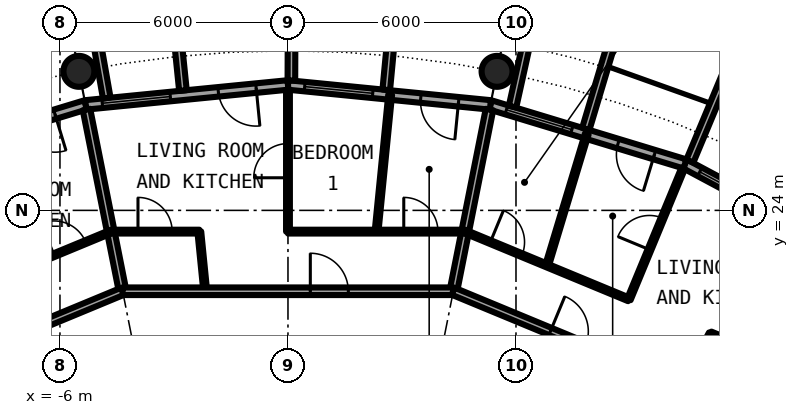
"""IFC4 building model, lengths in metres.
Left out: names, types, materials, properties, quantities, classifications, styles, units other than length and angle.
Written with IfcOpenShell. Run it as: python <this file> out.ifc"""

import sys

from ifc_helpers import new_model, si_unit, direction, frame, frame_2d, origin, origin_2d, place, context, subcontext, project, spatial, rectangle, hollow_circle, extrude, element, fill, save


model = new_model("IFC4")
c1 = context("Model", 3, precision=1e-05, world=origin(), true_north=direction((0.0, 1.0)))
c2 = subcontext(c1, "Body", "Model", "MODEL_VIEW")
j1 = project(units=[si_unit("LENGTHUNIT", "METRE"), si_unit("PLANEANGLEUNIT", "RADIAN")], contexts=[c1])
p1 = place(None, origin())
s1 = spatial("IfcSite", under=j1, at=p1, CompositionType="ELEMENT")
p2 = place(p1, origin())
s2 = spatial("IfcBuilding", under=s1, at=p2, CompositionType="ELEMENT")
p3 = place(p2, frame((0.0, 0.0, 170.75)))
s3 = spatial("IfcBuildingStorey", under=s2, at=p3, CompositionType="ELEMENT", Elevation=170.75)
for number, where, z_axis, x_axis in (
    (1, (5.501, 27.658, 0.0), (0.0, 0.0, 1.0), (1.0, 0.0, 0.0)),
    (2, (-5.501, 27.658, 0.0), (0.0, 0.0, 1.0), (1.0, 0.0, 0.0)),
):
    element("IfcColumn", number, at=place(p3, frame(where, z_axis=z_axis, x_axis=x_axis)), inside=s3, PredefinedType="COLUMN", context=c2, shape_type="SweptSolid", body=[
        extrude(hollow_circle(Radius=0.406, WallThickness=0.04, at=origin_2d()), origin(), (0.0, 0.0, 1.0), 3.05),
    ])
p4 = place(p3, frame((15.167, 22.699, 0.0), z_axis=(0.0, 0.0, 1.0), x_axis=(-0.881915646801, 0.471407246368, 0.0)))
e3 = element("IfcWall", 3, at=p4, inside=s3, PredefinedType="SOLIDWALL", context=c2, shape_type="SweptSolid", body=[
    extrude(rectangle(XDim=5.352, YDim=0.25, at=frame_2d((2.676, 0.0))), origin(), (0.0, 0.0, 1.0), 2.7),
])
p5 = place(p4, frame((0.841, 0.0, 0.0)))
e4 = element("IfcOpeningElement", 4, at=p5, cuts=e3, PredefinedType="OPENING", context=c2, shape_type="SweptSolid", body=[
    extrude(rectangle(XDim=1.0, YDim=2.2, at=frame_2d((0.5, 1.1))), frame((0.0, 0.135, 0.0), z_axis=(0.0, -1.0, 0.0), x_axis=(1.0, 0.0, 0.0)), (0.0, 0.0, 1.0), 0.27),
])
p6 = place(p4, frame((3.111, 0.0, 0.3)))
e5 = element("IfcOpeningElement", 5, at=p6, cuts=e3, PredefinedType="OPENING", context=c2, shape_type="SweptSolid", body=[
    extrude(rectangle(XDim=1.8, YDim=2.1, at=frame_2d((0.9, 1.05))), frame((0.0, 0.135, 0.0), z_axis=(0.0, -1.0, 0.0), x_axis=(1.0, 0.0, 0.0)), (0.0, 0.0, 1.0), 0.27),
])
p7 = place(p3, frame((10.575, 25.295, -0.03), z_axis=(0.0, 0.0, 1.0), x_axis=(0.385697364644, 0.922625353492, 0.0)))
e6 = element("IfcWall", 6, at=p7, inside=s3, PredefinedType="SOLIDWALL", context=c2, shape_type="SweptSolid", body=[
    extrude(rectangle(XDim=2.883, YDim=0.2, at=frame_2d((1.442, 0.0))), origin(), (0.0, 0.0, 1.0), 2.73),
])
p8 = place(p3, frame((10.447, 25.222, 0.0), z_axis=(0.0, 0.0, 1.0), x_axis=(-0.956965678721, 0.290201119486, 0.0)))
e7 = element("IfcWall", 7, at=p8, inside=s3, PredefinedType="SOLIDWALL", context=c2, shape_type="SweptSolid", body=[
    extrude(rectangle(XDim=5.351, YDim=0.25, at=frame_2d((2.676, 0.0))), origin(), (0.0, 0.0, 1.0), 2.7),
])
p9 = place(p8, frame((0.841, 0.0, 0.0)))
e8 = element("IfcOpeningElement", 8, at=p9, cuts=e7, PredefinedType="OPENING", context=c2, shape_type="SweptSolid", body=[
    extrude(rectangle(XDim=1.0, YDim=2.2, at=frame_2d((0.5, 1.1))), frame((0.0, 0.135, 0.0), z_axis=(0.0, -1.0, 0.0), x_axis=(1.0, 0.0, 0.0)), (0.0, 0.0, 1.0), 0.27),
])
p10 = place(p8, frame((3.111, 0.0, 0.3)))
e9 = element("IfcOpeningElement", 9, at=p10, cuts=e7, PredefinedType="OPENING", context=c2, shape_type="SweptSolid", body=[
    extrude(rectangle(XDim=1.8, YDim=2.1, at=frame_2d((0.9, 1.05))), frame((0.0, 0.135, 0.0), z_axis=(0.0, -1.0, 0.0), x_axis=(1.0, 0.0, 0.0)), (0.0, 0.0, 1.0), 0.27),
])
p11 = place(p3, frame((7.837, 26.144, -0.03), z_axis=(0.0, 0.0, 1.0), x_axis=(0.287064767992, 0.957911174889, 0.0)))
e10 = element("IfcWall", 10, at=p11, inside=s3, PredefinedType="SOLIDWALL", context=c2, shape_type="SweptSolid", body=[
    extrude(rectangle(XDim=3.006, YDim=0.2, at=frame_2d((1.503, 0.0))), origin(), (0.0, 0.0, 1.0), 2.73),
])
p12 = place(p3, frame((5.909, 26.729, -0.03), z_axis=(0.0, 0.0, 1.0), x_axis=(0.216409053917, 0.976302781612, 0.0)))
e11 = element("IfcWall", 11, at=p12, inside=s3, PredefinedType="SOLIDWALL", context=c2, shape_type="SweptSolid", body=[
    extrude(rectangle(XDim=2.925, YDim=0.2, at=frame_2d((1.463, 0.0))), origin(), (0.0, 0.0, 1.0), 2.73),
])
p13 = place(p3, frame((5.326, 26.775, 0.0), z_axis=(0.0, 0.0, 1.0), x_axis=(-0.995173996315, 0.098126026407, 0.0)))
e12 = element("IfcWall", 12, at=p13, inside=s3, PredefinedType="SOLIDWALL", context=c2, shape_type="SweptSolid", body=[
    extrude(rectangle(XDim=5.352, YDim=0.25, at=frame_2d((2.676, 0.0))), origin(), (0.0, 0.0, 1.0), 2.7),
])
p14 = place(p13, frame((0.841, 0.0, 0.0)))
e13 = element("IfcOpeningElement", 13, at=p14, cuts=e12, PredefinedType="OPENING", context=c2, shape_type="SweptSolid", body=[
    extrude(rectangle(XDim=1.0, YDim=2.2, at=frame_2d((0.5, 1.1))), frame((0.0, 0.135, 0.0), z_axis=(0.0, -1.0, 0.0), x_axis=(1.0, 0.0, 0.0)), (0.0, 0.0, 1.0), 0.27),
])
p15 = place(p13, frame((3.111, 0.0, 0.3)))
e14 = element("IfcOpeningElement", 14, at=p15, cuts=e12, PredefinedType="OPENING", context=c2, shape_type="SweptSolid", body=[
    extrude(rectangle(XDim=1.8, YDim=2.1, at=frame_2d((0.9, 1.05))), frame((0.0, 0.135, 0.0), z_axis=(0.0, -1.0, 0.0), x_axis=(1.0, 0.0, 0.0)), (0.0, 0.0, 1.0), 0.27),
])
p16 = place(p3, frame((2.586, 27.171, -0.03), z_axis=(0.0, 0.0, 1.0), x_axis=(0.094548432284, 0.995520262954, 0.0)))
e15 = element("IfcWall", 15, at=p16, inside=s3, PredefinedType="SOLIDWALL", context=c2, shape_type="SweptSolid", body=[
    extrude(rectangle(XDim=3.006, YDim=0.2, at=frame_2d((1.503, 0.0))), origin(), (0.0, 0.0, 1.0), 2.73),
])
p17 = place(p3, frame((0.09, 27.417, -0.03), z_axis=(0.0, 0.0, 1.0), x_axis=(0.00347308367, 0.999993968827, 0.0)))
e16 = element("IfcWall", 16, at=p17, inside=s3, PredefinedType="SOLIDWALL", context=c2, shape_type="SweptSolid", body=[
    extrude(rectangle(XDim=2.882, YDim=0.2, at=frame_2d((1.441, 0.0))), origin(), (0.0, 0.0, 1.0), 2.73),
])
p18 = place(p3, frame((0.0, 27.3, 0.0), z_axis=(0.0, 0.0, 1.0), x_axis=(-0.995173996315, -0.098126026407, 0.0)))
e17 = element("IfcWall", 17, at=p18, inside=s3, PredefinedType="SOLIDWALL", context=c2, shape_type="SweptSolid", body=[
    extrude(rectangle(XDim=5.352, YDim=0.25, at=frame_2d((2.676, 0.0))), origin(), (0.0, 0.0, 1.0), 2.7),
])
p19 = place(p18, frame((0.841, 0.0, 0.0)))
e18 = element("IfcOpeningElement", 18, at=p19, cuts=e17, PredefinedType="OPENING", context=c2, shape_type="SweptSolid", body=[
    extrude(rectangle(XDim=1.0, YDim=2.2, at=frame_2d((0.5, 1.1))), frame((0.0, 0.135, 0.0), z_axis=(0.0, -1.0, 0.0), x_axis=(1.0, 0.0, 0.0)), (0.0, 0.0, 1.0), 0.27),
])
p20 = place(p18, frame((3.111, 0.0, 0.3)))
e19 = element("IfcOpeningElement", 19, at=p20, cuts=e17, PredefinedType="OPENING", context=c2, shape_type="SweptSolid", body=[
    extrude(rectangle(XDim=1.8, YDim=2.1, at=frame_2d((0.9, 1.05))), frame((0.0, 0.135, 0.0), z_axis=(0.0, -1.0, 0.0), x_axis=(1.0, 0.0, 0.0)), (0.0, 0.0, 1.0), 0.27),
])
p21 = place(p3, frame((-2.764, 27.153, -0.03), z_axis=(0.0, 0.0, 1.0), x_axis=(-0.101505487237, 0.994834979311, 0.0)))
e20 = element("IfcWall", 20, at=p21, inside=s3, PredefinedType="SOLIDWALL", context=c2, shape_type="SweptSolid", body=[
    extrude(rectangle(XDim=3.007, YDim=0.2, at=frame_2d((1.503, 0.0))), origin(), (0.0, 0.0, 1.0), 2.73),
])
p22 = place(p3, frame((-4.769, 26.956, -0.03), z_axis=(0.0, 0.0, 1.0), x_axis=(-0.174056778901, 0.984735618183, 0.0)))
e21 = element("IfcWall", 21, at=p22, inside=s3, PredefinedType="SOLIDWALL", context=c2, shape_type="SweptSolid", body=[
    extrude(rectangle(XDim=2.925, YDim=0.2, at=frame_2d((1.462, 0.0))), origin(), (0.0, 0.0, 1.0), 2.73),
])
p23 = place(p3, frame((-5.326, 26.775, 0.0), z_axis=(0.0, 0.0, 1.0), x_axis=(-0.956965678721, -0.290201119486, 0.0)))
e22 = element("IfcWall", 22, at=p23, inside=s3, PredefinedType="SOLIDWALL", context=c2, shape_type="SweptSolid", body=[
    extrude(rectangle(XDim=5.351, YDim=0.25, at=frame_2d((2.676, 0.0))), origin(), (0.0, 0.0, 1.0), 2.7),
])
p24 = place(p23, frame((0.841, 0.0, 0.0)))
e23 = element("IfcOpeningElement", 23, at=p24, cuts=e22, PredefinedType="OPENING", context=c2, shape_type="SweptSolid", body=[
    extrude(rectangle(XDim=1.0, YDim=2.2, at=frame_2d((0.5, 1.1))), frame((0.0, 0.135, 0.0), z_axis=(0.0, -1.0, 0.0), x_axis=(1.0, 0.0, 0.0)), (0.0, 0.0, 1.0), 0.27),
])
p25 = place(p23, frame((3.111, 0.0, 0.3)))
e24 = element("IfcOpeningElement", 24, at=p25, cuts=e22, PredefinedType="OPENING", context=c2, shape_type="SweptSolid", body=[
    extrude(rectangle(XDim=1.8, YDim=2.1, at=frame_2d((0.9, 1.05))), frame((0.0, 0.135, 0.0), z_axis=(0.0, -1.0, 0.0), x_axis=(1.0, 0.0, 0.0)), (0.0, 0.0, 1.0), 0.27),
])
p26 = place(p3, frame((10.38, 19.374, 0.0), z_axis=(0.0, 0.0, 1.0), x_axis=(0.472002235476, 0.881597351236, 0.0)))
e25 = element("IfcWall", 25, at=p26, inside=s3, PredefinedType="PARTITIONING", context=c2, shape_type="SweptSolid", body=[
    extrude(rectangle(XDim=1.577, YDim=0.1, at=frame_2d((0.788, 0.0))), origin(), (0.0, 0.0, 1.0), 2.7),
])
p27 = place(p3, frame((-5.302, 26.653, 0.0), z_axis=(0.0, 0.0, 1.0), x_axis=(0.195075825861, -0.980788163756, 0.0)))
e26 = element("IfcWall", 26, at=p27, inside=s3, PredefinedType="PARTITIONING", context=c2, shape_type="SweptSolid", body=[
    extrude(rectangle(XDim=4.875, YDim=0.2, at=frame_2d((2.438, 0.0))), origin(), (0.0, 0.0, 1.0), 2.7),
])
p28 = place(p3, frame((-2.333, 23.441, 0.0), z_axis=(0.0, 0.0, 1.0), x_axis=(0.098951748623, -0.995092232632, 0.0)))
e27 = element("IfcWall", 27, at=p28, inside=s3, PredefinedType="PARTITIONING", context=c2, shape_type="SweptSolid", body=[
    extrude(rectangle(XDim=1.577, YDim=0.1, at=frame_2d((0.788, 0.0))), origin(), (0.0, 0.0, 1.0), 2.7),
])
p29 = place(p3, frame((0.0, 23.441, 0.0), z_axis=(0.0, 0.0, 1.0), x_axis=(0.0, 1.0, 0.0)))
e28 = element("IfcWall", 28, at=p29, inside=s3, PredefinedType="PARTITIONING", context=c2, shape_type="SweptSolid", body=[
    extrude(rectangle(XDim=3.734, YDim=0.1, at=frame_2d((1.867, 0.0))), origin(), (0.0, 0.0, 1.0), 2.7),
])
p30 = place(p29, frame((1.417, 0.0, 0.0)))
e29 = element("IfcOpeningElement", 29, at=p30, cuts=e28, PredefinedType="OPENING", context=c2, shape_type="SweptSolid", body=[
    extrude(rectangle(XDim=0.9, YDim=2.3, at=frame_2d((0.45, 1.15))), frame((0.0, 0.06, 0.0), z_axis=(0.0, -1.0, 0.0), x_axis=(1.0, 0.0, 0.0)), (0.0, 0.0, 1.0), 0.12),
])
p31 = place(p3, frame((2.331, 23.441, 0.0), z_axis=(0.0, 0.0, 1.0), x_axis=(0.098902534616, 0.995097125233, 0.0)))
e30 = element("IfcWall", 30, at=p31, inside=s3, PredefinedType="PARTITIONING", context=c2, shape_type="SweptSolid", body=[
    extrude(rectangle(XDim=3.619, YDim=0.1, at=frame_2d((1.81, 0.0))), origin(), (0.0, 0.0, 1.0), 2.7),
])
p32 = place(p3, frame((4.351, 21.872, 0.0), z_axis=(0.0, 0.0, 1.0), x_axis=(0.195075825861, 0.980788163756, 0.0)))
e31 = element("IfcWall", 31, at=p32, inside=s3, PredefinedType="PARTITIONING", context=c2, shape_type="SweptSolid", body=[
    extrude(rectangle(XDim=4.875, YDim=0.2, at=frame_2d((2.438, 0.0))), origin(), (0.0, 0.0, 1.0), 2.7),
])
p33 = place(p3, frame((6.817, 22.549, 0.0), z_axis=(0.0, 0.0, 1.0), x_axis=(0.289439829793, 0.957196210256, 0.0)))
e32 = element("IfcWall", 32, at=p33, inside=s3, PredefinedType="PARTITIONING", context=c2, shape_type="SweptSolid", body=[
    extrude(rectangle(XDim=3.618, YDim=0.1, at=frame_2d((1.809, 0.0))), origin(), (0.0, 0.0, 1.0), 2.7),
])
p34 = place(p3, frame((8.97, 21.657, 0.0), z_axis=(0.0, 0.0, 1.0), x_axis=(0.382761856702, 0.923847044188, 0.0)))
e33 = element("IfcWall", 33, at=p34, inside=s3, PredefinedType="PARTITIONING", context=c2, shape_type="SweptSolid", body=[
    extrude(rectangle(XDim=3.733, YDim=0.1, at=frame_2d((1.867, 0.0))), origin(), (0.0, 0.0, 1.0), 2.7),
])
p35 = place(p34, frame((1.417, 0.0, 0.0)))
e34 = element("IfcOpeningElement", 34, at=p35, cuts=e33, PredefinedType="OPENING", context=c2, shape_type="SweptSolid", body=[
    extrude(rectangle(XDim=0.9, YDim=2.3, at=frame_2d((0.45, 1.15))), frame((0.0, 0.06, 0.0), z_axis=(0.0, -1.0, 0.0), x_axis=(1.0, 0.0, 0.0)), (0.0, 0.0, 1.0), 0.12),
])
p36 = place(p3, frame((-12.396, 18.536, 0.0), z_axis=(0.0, 0.0, 1.0), x_axis=(0.923722518166, 0.383062278792, 0.0)))
e35 = element("IfcWall", 35, at=p36, inside=s3, PredefinedType="PARTITIONING", context=c2, shape_type="SweptSolid", body=[
    extrude(rectangle(XDim=8.709, YDim=0.2, at=frame_2d((4.354, 0.0))), origin(), (0.0, 0.0, 1.0), 2.7),
])
p37 = place(p36, frame((2.772, 0.0, 0.0)))
e36 = element("IfcOpeningElement", 36, at=p37, cuts=e35, PredefinedType="OPENING", context=c2, shape_type="SweptSolid", body=[
    extrude(rectangle(XDim=1.0, YDim=2.3, at=frame_2d((0.5, 1.15))), frame((0.0, 0.11, 0.0), z_axis=(0.0, -1.0, 0.0), x_axis=(1.0, 0.0, 0.0)), (0.0, 0.0, 1.0), 0.22),
])
p38 = place(p3, frame((-4.351, 21.872, 0.0), z_axis=(0.0, 0.0, 1.0), x_axis=(1.0, 0.0, 0.0)))
e37 = element("IfcWall", 37, at=p38, inside=s3, PredefinedType="PARTITIONING", context=c2, shape_type="SweptSolid", body=[
    extrude(rectangle(XDim=8.702, YDim=0.2, at=frame_2d((4.351, 0.0))), origin(), (0.0, 0.0, 1.0), 2.7),
])
p39 = place(p38, frame((4.939, 0.0, 0.0)))
e38 = element("IfcOpeningElement", 38, at=p39, cuts=e37, PredefinedType="OPENING", context=c2, shape_type="SweptSolid", body=[
    extrude(rectangle(XDim=1.0, YDim=2.3, at=frame_2d((0.5, 1.15))), frame((0.0, 0.11, 0.0), z_axis=(0.0, -1.0, 0.0), x_axis=(1.0, 0.0, 0.0)), (0.0, 0.0, 1.0), 0.22),
])
p40 = place(p3, frame((4.347, 21.872, 0.0), z_axis=(0.0, 0.0, 1.0), x_axis=(0.923921124994, -0.382583003792, 0.0)))
e39 = element("IfcWall", 39, at=p40, inside=s3, PredefinedType="PARTITIONING", context=c2, shape_type="SweptSolid", body=[
    extrude(rectangle(XDim=8.704, YDim=0.2, at=frame_2d((4.352, 0.0))), origin(), (0.0, 0.0, 1.0), 2.7),
])
p41 = place(p40, frame((2.767, 0.0, 0.0)))
e40 = element("IfcOpeningElement", 40, at=p41, cuts=e39, PredefinedType="OPENING", context=c2, shape_type="SweptSolid", body=[
    extrude(rectangle(XDim=1.0, YDim=2.3, at=frame_2d((0.5, 1.15))), frame((0.0, 0.11, 0.0), z_axis=(0.0, -1.0, 0.0), x_axis=(1.0, 0.0, 0.0)), (0.0, 0.0, 1.0), 0.22),
])
p42 = place(p3, frame((-6.817, 22.548, 0.0), z_axis=(0.0, 0.0, 1.0), x_axis=(0.924061443507, 0.382243964798, 0.0)))
e41 = element("IfcWall", 41, at=p42, inside=s3, PredefinedType="PARTITIONING", context=c2, shape_type="SweptSolid", body=[
    extrude(rectangle(XDim=2.333, YDim=0.1, at=frame_2d((1.167, 0.0))), origin(), (0.0, 0.0, 1.0), 2.7),
])
p43 = place(p42, frame((0.717, 0.0, 0.0)))
e42 = element("IfcOpeningElement", 42, at=p43, cuts=e41, PredefinedType="OPENING", context=c2, shape_type="SweptSolid", body=[
    extrude(rectangle(XDim=0.9, YDim=2.3, at=frame_2d((0.45, 1.15))), frame((0.0, 0.06, 0.0), z_axis=(0.0, -1.0, 0.0), x_axis=(1.0, 0.0, 0.0)), (0.0, 0.0, 1.0), 0.12),
])
p44 = place(p3, frame((-4.663, 23.441, 0.0), z_axis=(0.0, 0.0, 1.0), x_axis=(1.0, 0.0, 0.0)))
e43 = element("IfcWall", 43, at=p44, inside=s3, PredefinedType="PARTITIONING", context=c2, shape_type="SweptSolid", body=[
    extrude(rectangle(XDim=2.332, YDim=0.1, at=frame_2d((1.166, 0.0))), origin(), (0.0, 0.0, 1.0), 2.7),
])
p45 = place(p44, frame((0.716, 0.0, 0.0)))
e44 = element("IfcOpeningElement", 44, at=p45, cuts=e43, PredefinedType="OPENING", context=c2, shape_type="SweptSolid", body=[
    extrude(rectangle(XDim=0.9, YDim=2.3, at=frame_2d((0.45, 1.15))), frame((0.0, 0.06, 0.0), z_axis=(0.0, -1.0, 0.0), x_axis=(1.0, 0.0, 0.0)), (0.0, 0.0, 1.0), 0.12),
])
p46 = place(p3, frame((0.0, 23.441, 0.0), z_axis=(0.0, 0.0, 1.0), x_axis=(1.0, 0.0, 0.0)))
e45 = element("IfcWall", 45, at=p46, inside=s3, PredefinedType="PARTITIONING", context=c2, shape_type="SweptSolid", body=[
    extrude(rectangle(XDim=4.663, YDim=0.1, at=frame_2d((2.332, 0.0))), origin(), (0.0, 0.0, 1.0), 2.7),
])
p47 = place(p46, frame((3.047, 0.0, 0.0)))
e46 = element("IfcOpeningElement", 46, at=p47, cuts=e45, PredefinedType="OPENING", context=c2, shape_type="SweptSolid", body=[
    extrude(rectangle(XDim=0.9, YDim=2.3, at=frame_2d((0.45, 1.15))), frame((0.0, 0.06, 0.0), z_axis=(0.0, -1.0, 0.0), x_axis=(1.0, 0.0, 0.0)), (0.0, 0.0, 1.0), 0.12),
])
p48 = place(p3, frame((4.66, 23.441, 0.0), z_axis=(0.0, 0.0, 1.0), x_axis=(0.923920484476, -0.38258455061, 0.0)))
e47 = element("IfcWall", 47, at=p48, inside=s3, PredefinedType="PARTITIONING", context=c2, shape_type="SweptSolid", body=[
    extrude(rectangle(XDim=4.663, YDim=0.1, at=frame_2d((2.332, 0.0))), origin(), (0.0, 0.0, 1.0), 2.7),
])
p49 = place(p48, frame((0.72, 0.0, 0.0)))
e48 = element("IfcOpeningElement", 48, at=p49, cuts=e47, PredefinedType="OPENING", context=c2, shape_type="SweptSolid", body=[
    extrude(rectangle(XDim=0.9, YDim=2.3, at=frame_2d((0.45, 1.15))), frame((0.0, 0.06, 0.0), z_axis=(0.0, -1.0, 0.0), x_axis=(1.0, 0.0, 0.0)), (0.0, 0.0, 1.0), 0.12),
])
p50 = place(p3, frame((11.124, 20.764, 0.0), z_axis=(0.0, 0.0, 1.0), x_axis=(0.923938991376, -0.382539854414, 0.0)))
e49 = element("IfcWall", 49, at=p50, inside=s3, PredefinedType="PARTITIONING", context=c2, shape_type="SweptSolid", body=[
    extrude(rectangle(XDim=2.331, YDim=0.1, at=frame_2d((1.166, 0.0))), origin(), (0.0, 0.0, 1.0), 2.7),
])
p51 = place(p50, frame((0.716, 0.0, 0.0)))
e50 = element("IfcOpeningElement", 50, at=p51, cuts=e49, PredefinedType="OPENING", context=c2, shape_type="SweptSolid", body=[
    extrude(rectangle(XDim=0.9, YDim=2.3, at=frame_2d((0.45, 1.15))), frame((0.0, 0.06, 0.0), z_axis=(0.0, -1.0, 0.0), x_axis=(1.0, 0.0, 0.0)), (0.0, 0.0, 1.0), 0.12),
])
p52 = place(p6, origin())
e51 = element("IfcWindow", 51, at=p52, inside=s3, PartitioningType="SINGLE_PANEL", PredefinedType="WINDOW", context=c2, shape_type="SweptSolid", body=[
    extrude(rectangle(XDim=1.8, YDim=2.1, at=frame_2d((0.9, 1.05))), frame((0.0, 0.03, 0.0), z_axis=(0.0, -1.0, 0.0), x_axis=(1.0, 0.0, 0.0)), (0.0, 0.0, 1.0), 0.06),
])
fill(e5, e51)
p53 = place(p9, origin())
e52 = element("IfcDoor", 52, at=p53, inside=s3, OperationType="SINGLE_SWING_LEFT", PredefinedType="DOOR", context=c2, shape_type="SweptSolid", body=[
    extrude(rectangle(XDim=1.0, YDim=2.2, at=frame_2d((0.5, 1.1))), frame((0.0, 0.025, 0.0), z_axis=(0.0, -1.0, 0.0), x_axis=(1.0, 0.0, 0.0)), (0.0, 0.0, 1.0), 0.05),
])
fill(e8, e52)
p54 = place(p10, origin())
e53 = element("IfcWindow", 53, at=p54, inside=s3, PartitioningType="SINGLE_PANEL", PredefinedType="WINDOW", context=c2, shape_type="SweptSolid", body=[
    extrude(rectangle(XDim=1.8, YDim=2.1, at=frame_2d((0.9, 1.05))), frame((0.0, 0.03, 0.0), z_axis=(0.0, -1.0, 0.0), x_axis=(1.0, 0.0, 0.0)), (0.0, 0.0, 1.0), 0.06),
])
fill(e9, e53)
p55 = place(p14, origin())
e54 = element("IfcDoor", 54, at=p55, inside=s3, OperationType="SINGLE_SWING_LEFT", PredefinedType="DOOR", context=c2, shape_type="SweptSolid", body=[
    extrude(rectangle(XDim=1.0, YDim=2.2, at=frame_2d((0.5, 1.1))), frame((0.0, 0.025, 0.0), z_axis=(0.0, -1.0, 0.0), x_axis=(1.0, 0.0, 0.0)), (0.0, 0.0, 1.0), 0.05),
])
fill(e13, e54)
p56 = place(p15, origin())
e55 = element("IfcWindow", 55, at=p56, inside=s3, PartitioningType="SINGLE_PANEL", PredefinedType="WINDOW", context=c2, shape_type="SweptSolid", body=[
    extrude(rectangle(XDim=1.8, YDim=2.1, at=frame_2d((0.9, 1.05))), frame((0.0, 0.03, 0.0), z_axis=(0.0, -1.0, 0.0), x_axis=(1.0, 0.0, 0.0)), (0.0, 0.0, 1.0), 0.06),
])
fill(e14, e55)
p57 = place(p19, origin())
e56 = element("IfcDoor", 56, at=p57, inside=s3, OperationType="SINGLE_SWING_LEFT", PredefinedType="DOOR", context=c2, shape_type="SweptSolid", body=[
    extrude(rectangle(XDim=1.0, YDim=2.2, at=frame_2d((0.5, 1.1))), frame((0.0, 0.025, 0.0), z_axis=(0.0, -1.0, 0.0), x_axis=(1.0, 0.0, 0.0)), (0.0, 0.0, 1.0), 0.05),
])
fill(e18, e56)
p58 = place(p20, origin())
e57 = element("IfcWindow", 57, at=p58, inside=s3, PartitioningType="SINGLE_PANEL", PredefinedType="WINDOW", context=c2, shape_type="SweptSolid", body=[
    extrude(rectangle(XDim=1.8, YDim=2.1, at=frame_2d((0.9, 1.05))), frame((0.0, 0.03, 0.0), z_axis=(0.0, -1.0, 0.0), x_axis=(1.0, 0.0, 0.0)), (0.0, 0.0, 1.0), 0.06),
])
fill(e19, e57)
p59 = place(p24, origin())
e58 = element("IfcDoor", 58, at=p59, inside=s3, OperationType="SINGLE_SWING_LEFT", PredefinedType="DOOR", context=c2, shape_type="SweptSolid", body=[
    extrude(rectangle(XDim=1.0, YDim=2.2, at=frame_2d((0.5, 1.1))), frame((0.0, 0.025, 0.0), z_axis=(0.0, -1.0, 0.0), x_axis=(1.0, 0.0, 0.0)), (0.0, 0.0, 1.0), 0.05),
])
fill(e23, e58)
p60 = place(p41, origin())
e59 = element("IfcDoor", 59, at=p60, inside=s3, OperationType="SINGLE_SWING_LEFT", PredefinedType="DOOR", context=c2, shape_type="SweptSolid", body=[
    extrude(rectangle(XDim=1.0, YDim=2.3, at=frame_2d((0.5, 1.15))), frame((0.0, 0.025, 0.0), z_axis=(0.0, -1.0, 0.0), x_axis=(1.0, 0.0, 0.0)), (0.0, 0.0, 1.0), 0.05),
])
fill(e40, e59)
p61 = place(p35, origin())
e60 = element("IfcDoor", 60, at=p61, inside=s3, OperationType="SINGLE_SWING_LEFT", PredefinedType="DOOR", context=c2, shape_type="SweptSolid", body=[
    extrude(rectangle(XDim=0.9, YDim=2.3, at=frame_2d((0.45, 1.15))), frame((0.0, 0.025, 0.0), z_axis=(0.0, -1.0, 0.0), x_axis=(1.0, 0.0, 0.0)), (0.0, 0.0, 1.0), 0.05),
])
fill(e34, e60)
p62 = place(p49, origin())
e61 = element("IfcDoor", 61, at=p62, inside=s3, OperationType="SINGLE_SWING_LEFT", PredefinedType="DOOR", context=c2, shape_type="SweptSolid", body=[
    extrude(rectangle(XDim=0.9, YDim=2.3, at=frame_2d((0.45, 1.15))), frame((0.0, 0.025, 0.0), z_axis=(0.0, -1.0, 0.0), x_axis=(1.0, 0.0, 0.0)), (0.0, 0.0, 1.0), 0.05),
])
fill(e48, e61)
p63 = place(p39, origin())
e62 = element("IfcDoor", 62, at=p63, inside=s3, OperationType="SINGLE_SWING_RIGHT", PredefinedType="DOOR", context=c2, shape_type="SweptSolid", body=[
    extrude(rectangle(XDim=1.0, YDim=2.3, at=frame_2d((0.5, 1.15))), frame((0.0, 0.025, 0.0), z_axis=(0.0, -1.0, 0.0), x_axis=(1.0, 0.0, 0.0)), (0.0, 0.0, 1.0), 0.05),
])
fill(e38, e62)
p64 = place(p45, origin())
e63 = element("IfcDoor", 63, at=p64, inside=s3, OperationType="SINGLE_SWING_RIGHT", PredefinedType="DOOR", context=c2, shape_type="SweptSolid", body=[
    extrude(rectangle(XDim=0.9, YDim=2.3, at=frame_2d((0.45, 1.15))), frame((0.0, 0.025, 0.0), z_axis=(0.0, -1.0, 0.0), x_axis=(1.0, 0.0, 0.0)), (0.0, 0.0, 1.0), 0.05),
])
fill(e44, e63)
p65 = place(p30, origin())
e64 = element("IfcDoor", 64, at=p65, inside=s3, OperationType="SINGLE_SWING_RIGHT", PredefinedType="DOOR", context=c2, shape_type="SweptSolid", body=[
    extrude(rectangle(XDim=0.9, YDim=2.3, at=frame_2d((0.45, 1.15))), frame((0.0, 0.025, 0.0), z_axis=(0.0, -1.0, 0.0), x_axis=(1.0, 0.0, 0.0)), (0.0, 0.0, 1.0), 0.05),
])
fill(e29, e64)
p66 = place(p47, origin())
e65 = element("IfcDoor", 65, at=p66, inside=s3, OperationType="SINGLE_SWING_RIGHT", PredefinedType="DOOR", context=c2, shape_type="SweptSolid", body=[
    extrude(rectangle(XDim=0.9, YDim=2.3, at=frame_2d((0.45, 1.15))), frame((0.0, 0.025, 0.0), z_axis=(0.0, -1.0, 0.0), x_axis=(1.0, 0.0, 0.0)), (0.0, 0.0, 1.0), 0.05),
])
fill(e46, e65)
p67 = place(p43, origin())
e66 = element("IfcDoor", 66, at=p67, inside=s3, OperationType="SINGLE_SWING_RIGHT", PredefinedType="DOOR", context=c2, shape_type="SweptSolid", body=[
    extrude(rectangle(XDim=0.9, YDim=2.3, at=frame_2d((0.45, 1.15))), frame((0.0, 0.025, 0.0), z_axis=(0.0, -1.0, 0.0), x_axis=(1.0, 0.0, 0.0)), (0.0, 0.0, 1.0), 0.05),
])
fill(e42, e66)
save(model, sys.argv[1])
